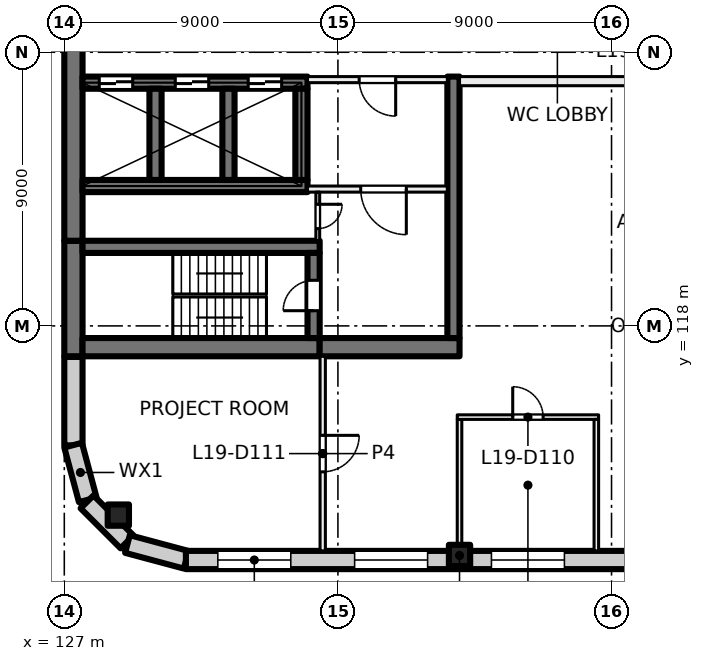
"""IFC4 building model, lengths in metres.
Left out: names, types, materials, properties, quantities, classifications, styles, units other than length and angle.
Written with IfcOpenShell. Run it as: python <this file> out.ifc"""

import sys

from ifc_helpers import new_model, si_unit, direction, frame, frame_2d, origin, origin_2d, place, context, subcontext, project, spatial, rectangle, extrude, element, fill, save


model = new_model("IFC4")
c1 = context("Model", 3, precision=1e-05, world=origin(), true_north=direction((0.0, 1.0)))
c2 = subcontext(c1, "Body", "Model", "MODEL_VIEW")
j1 = project(units=[si_unit("LENGTHUNIT", "METRE"), si_unit("PLANEANGLEUNIT", "RADIAN")], contexts=[c1])
p1 = place(None, origin())
s1 = spatial("IfcSite", under=j1, at=p1, CompositionType="ELEMENT")
p2 = place(p1, origin())
s2 = spatial("IfcBuilding", under=s1, at=p2, CompositionType="ELEMENT")
p3 = place(p2, frame((0.0, 0.0, 85.0)))
s3 = spatial("IfcBuildingStorey", under=s2, at=p3, CompositionType="ELEMENT", Elevation=85.0)
for number, where, z_axis, x_axis in (
    (1, (128.777, 111.777, 0.0), (0.0, 0.0, 1.0), (1.0, 0.0, 0.0)),
    (2, (140.0, 110.45, 0.0), (0.0, 0.0, 1.0), (1.0, 0.0, 0.0)),
):
    element("IfcColumn", number, at=place(p3, frame(where, z_axis=z_axis, x_axis=x_axis)), inside=s3, PredefinedType="COLUMN", context=c2, shape_type="SweptSolid", body=[
        extrude(rectangle(XDim=0.7, YDim=0.7, at=origin_2d()), origin(), (0.0, 0.0, 1.0), 4.0),
    ])
p4 = place(p3, frame((127.3, 117.0, 0.0), z_axis=(0.0, 0.0, 1.0), x_axis=(0.0, 1.0, 0.0)))
e3 = element("IfcWall", 3, at=p4, inside=s3, PredefinedType="SHEAR", context=c2, shape_type="SweptSolid", body=[
    extrude(rectangle(XDim=3.8, YDim=0.6, at=frame_2d((1.9, 0.0))), origin(), (0.0, 0.0, 1.0), 4.0),
])
p5 = place(p3, frame((127.3, 120.8, 0.0), z_axis=(0.0, 0.0, 1.0), x_axis=(0.0, 1.0, 0.0)))
e4 = element("IfcWall", 4, at=p5, inside=s3, PredefinedType="SHEAR", context=c2, shape_type="SweptSolid", body=[
    extrude(rectangle(XDim=14.4, YDim=0.6, at=frame_2d((7.2, 0.0))), origin(), (0.0, 0.0, 1.0), 4.0),
])
p6 = place(p3, frame((127.6, 117.3, 0.0), z_axis=(0.0, 0.0, 1.0), x_axis=(1.0, 0.0, 0.0)))
e5 = element("IfcWall", 5, at=p6, inside=s3, PredefinedType="SHEAR", context=c2, shape_type="SweptSolid", body=[
    extrude(rectangle(XDim=7.8, YDim=0.6, at=frame_2d((3.9, 0.0))), origin(), (0.0, 0.0, 1.0), 4.0),
])
p7 = place(p3, frame((135.4, 117.3, 0.0), z_axis=(0.0, 0.0, 1.0), x_axis=(1.0, 0.0, 0.0)))
e6 = element("IfcWall", 6, at=p7, inside=s3, PredefinedType="SHEAR", context=c2, shape_type="SweptSolid", body=[
    extrude(rectangle(XDim=4.6, YDim=0.6, at=frame_2d((2.3, 0.0))), origin(), (0.0, 0.0, 1.0), 4.0),
])
p8 = place(p3, frame((127.6, 120.6, 0.0), z_axis=(0.0, 0.0, 1.0), x_axis=(1.0, 0.0, 0.0)))
e7 = element("IfcWall", 7, at=p8, inside=s3, PredefinedType="SHEAR", context=c2, shape_type="SweptSolid", body=[
    extrude(rectangle(XDim=7.8, YDim=0.4, at=frame_2d((3.9, 0.0))), origin(), (0.0, 0.0, 1.0), 4.0),
])
p9 = place(p3, frame((135.2, 117.6, 0.0), z_axis=(0.0, 0.0, 1.0), x_axis=(0.0, 1.0, 0.0)))
e8 = element("IfcWall", 8, at=p9, inside=s3, PredefinedType="SHEAR", context=c2, shape_type="SweptSolid", body=[
    extrude(rectangle(XDim=2.8, YDim=0.4, at=frame_2d((1.4, 0.0))), origin(), (0.0, 0.0, 1.0), 4.0),
])
p10 = place(p9, frame((0.9, 0.0, 0.0)))
e9 = element("IfcOpeningElement", 9, at=p10, cuts=e8, PredefinedType="OPENING", context=c2, shape_type="SweptSolid", body=[
    extrude(rectangle(XDim=1.0, YDim=2.1, at=frame_2d((0.5, 1.05))), frame((0.0, 0.21, 0.0), z_axis=(0.0, -1.0, 0.0), x_axis=(1.0, 0.0, 0.0)), (0.0, 0.0, 1.0), 0.42),
])
p11 = place(p3, frame((127.6, 126.0, 0.0), z_axis=(0.0, 0.0, 1.0), x_axis=(1.0, 0.0, 0.0)))
e10 = element("IfcWall", 10, at=p11, inside=s3, PredefinedType="SHEAR", context=c2, shape_type="SweptSolid", body=[
    extrude(rectangle(XDim=7.4, YDim=0.4, at=frame_2d((3.7, 0.0))), origin(), (0.0, 0.0, 1.0), 4.0),
])
p12 = place(p11, frame((0.55, 0.0, 0.0)))
e11 = element("IfcOpeningElement", 11, at=p12, cuts=e10, PredefinedType="OPENING", context=c2, shape_type="SweptSolid", body=[
    extrude(rectangle(XDim=1.1, YDim=2.1, at=frame_2d((0.55, 1.05))), frame((0.0, 0.21, 0.0), z_axis=(0.0, -1.0, 0.0), x_axis=(1.0, 0.0, 0.0)), (0.0, 0.0, 1.0), 0.42),
])
p13 = place(p11, frame((3.05, 0.0, 0.0)))
e12 = element("IfcOpeningElement", 12, at=p13, cuts=e10, PredefinedType="OPENING", context=c2, shape_type="SweptSolid", body=[
    extrude(rectangle(XDim=1.1, YDim=2.1, at=frame_2d((0.55, 1.05))), frame((0.0, 0.21, 0.0), z_axis=(0.0, -1.0, 0.0), x_axis=(1.0, 0.0, 0.0)), (0.0, 0.0, 1.0), 0.42),
])
p14 = place(p11, frame((5.45, 0.0, 0.0)))
e13 = element("IfcOpeningElement", 13, at=p14, cuts=e10, PredefinedType="OPENING", context=c2, shape_type="SweptSolid", body=[
    extrude(rectangle(XDim=1.1, YDim=2.1, at=frame_2d((0.55, 1.05))), frame((0.0, 0.21, 0.0), z_axis=(0.0, -1.0, 0.0), x_axis=(1.0, 0.0, 0.0)), (0.0, 0.0, 1.0), 0.42),
])
p15 = place(p3, frame((127.6, 122.6, 0.0), z_axis=(0.0, 0.0, 1.0), x_axis=(1.0, 0.0, 0.0)))
e14 = element("IfcWall", 14, at=p15, inside=s3, PredefinedType="SHEAR", context=c2, shape_type="SweptSolid", body=[
    extrude(rectangle(XDim=7.4, YDim=0.4, at=frame_2d((3.7, 0.0))), origin(), (0.0, 0.0, 1.0), 4.0),
])
for number, where, z_axis, x_axis in (
    (15, (130.0, 122.8, 0.0), (0.0, 0.0, 1.0), (0.0, 1.0, 0.0)),
    (16, (132.4, 122.8, 0.0), (0.0, 0.0, 1.0), (0.0, 1.0, 0.0)),
    (17, (134.8, 122.8, 0.0), (0.0, 0.0, 1.0), (0.0, 1.0, 0.0)),
):
    element("IfcWall", number, at=place(p3, frame(where, z_axis=z_axis, x_axis=x_axis)), inside=s3, PredefinedType="SHEAR", context=c2, shape_type="SweptSolid", body=[
        extrude(rectangle(XDim=3.0, YDim=0.4, at=frame_2d((1.5, 0.0))), origin(), (0.0, 0.0, 1.0), 4.0),
    ])
p16 = place(p3, frame((139.8, 117.6, 0.0), z_axis=(0.0, 0.0, 1.0), x_axis=(0.0, 1.0, 0.0)))
e18 = element("IfcWall", 18, at=p16, inside=s3, PredefinedType="SHEAR", context=c2, shape_type="SweptSolid", body=[
    extrude(rectangle(XDim=8.6, YDim=0.4, at=frame_2d((4.3, 0.0))), origin(), (0.0, 0.0, 1.0), 4.0),
])
p17 = place(p3, frame((127.3, 114.07, 0.0), z_axis=(0.0, 0.0, 1.0), x_axis=(0.0, 1.0, 0.0)))
e19 = element("IfcWall", 19, at=p17, inside=s3, PredefinedType="SOLIDWALL", context=c2, shape_type="SweptSolid", body=[
    extrude(rectangle(XDim=2.91, YDim=0.6, at=frame_2d((1.455, 0.0))), origin(), (0.0, 0.0, 1.0), 3.625),
])
for number, where, z_axis, x_axis in (
    (20, (127.771, 112.281, 0.0), (0.0, 0.0, 1.0), (-0.259, 0.966, 0.0)),
    (21, (129.064, 110.896, 0.0), (0.0, 0.0, 1.0), (-0.707, 0.707, 0.0)),
):
    element("IfcWall", number, at=place(p3, frame(where, z_axis=z_axis, x_axis=x_axis)), inside=s3, PredefinedType="SOLIDWALL", context=c2, shape_type="SweptSolid", body=[
        extrude(rectangle(XDim=1.861, YDim=0.6, at=frame_2d((0.93, 0.0))), origin(), (0.0, 0.0, 1.0), 3.625),
    ])
p18 = place(p3, frame((131.01, 110.308, 0.0), z_axis=(0.0, 0.0, 1.0), x_axis=(-0.965920269068, 0.258839784042, 0.0)))
e22 = element("IfcWall", 22, at=p18, inside=s3, PredefinedType="SOLIDWALL", context=c2, shape_type="SweptSolid", body=[
    extrude(rectangle(XDim=2.0, YDim=0.6, at=frame_2d((1.0, 0.0))), origin(), (0.0, 0.0, 1.0), 3.625),
])
p19 = place(p3, frame((162.93, 110.3, 0.0), z_axis=(0.0, 0.0, 1.0), x_axis=(-1.0, 0.0, 0.0)))
e23 = element("IfcWall", 23, at=p19, inside=s3, PredefinedType="SOLIDWALL", context=c2, shape_type="SweptSolid", body=[
    extrude(rectangle(XDim=31.93, YDim=0.6, at=frame_2d((15.965, 0.0))), origin(), (0.0, 0.0, 1.0), 3.625),
])
p20 = place(p19, frame((1.48, 0.0, 0.9)))
e24 = element("IfcOpeningElement", 24, at=p20, cuts=e23, PredefinedType="OPENING", context=c2, shape_type="SweptSolid", body=[
    extrude(rectangle(XDim=2.4, YDim=2.4, at=frame_2d((1.2, 1.2))), frame((0.0, 0.31, 0.0), z_axis=(0.0, -1.0, 0.0), x_axis=(1.0, 0.0, 0.0)), (0.0, 0.0, 1.0), 0.62),
])
p21 = place(p19, frame((5.98, 0.0, 0.9)))
e25 = element("IfcOpeningElement", 25, at=p21, cuts=e23, PredefinedType="OPENING", context=c2, shape_type="SweptSolid", body=[
    extrude(rectangle(XDim=2.4, YDim=2.4, at=frame_2d((1.2, 1.2))), frame((0.0, 0.31, 0.0), z_axis=(0.0, -1.0, 0.0), x_axis=(1.0, 0.0, 0.0)), (0.0, 0.0, 1.0), 0.62),
])
p22 = place(p19, frame((10.48, 0.0, 0.9)))
e26 = element("IfcOpeningElement", 26, at=p22, cuts=e23, PredefinedType="OPENING", context=c2, shape_type="SweptSolid", body=[
    extrude(rectangle(XDim=2.4, YDim=2.4, at=frame_2d((1.2, 1.2))), frame((0.0, 0.31, 0.0), z_axis=(0.0, -1.0, 0.0), x_axis=(1.0, 0.0, 0.0)), (0.0, 0.0, 1.0), 0.62),
])
p23 = place(p19, frame((14.98, 0.0, 0.9)))
e27 = element("IfcOpeningElement", 27, at=p23, cuts=e23, PredefinedType="OPENING", context=c2, shape_type="SweptSolid", body=[
    extrude(rectangle(XDim=2.4, YDim=2.4, at=frame_2d((1.2, 1.2))), frame((0.0, 0.31, 0.0), z_axis=(0.0, -1.0, 0.0), x_axis=(1.0, 0.0, 0.0)), (0.0, 0.0, 1.0), 0.62),
])
p24 = place(p19, frame((19.48, 0.0, 0.9)))
e28 = element("IfcOpeningElement", 28, at=p24, cuts=e23, PredefinedType="OPENING", context=c2, shape_type="SweptSolid", body=[
    extrude(rectangle(XDim=2.4, YDim=2.4, at=frame_2d((1.2, 1.2))), frame((0.0, 0.31, 0.0), z_axis=(0.0, -1.0, 0.0), x_axis=(1.0, 0.0, 0.0)), (0.0, 0.0, 1.0), 0.62),
])
p25 = place(p19, frame((23.98, 0.0, 0.9)))
e29 = element("IfcOpeningElement", 29, at=p25, cuts=e23, PredefinedType="OPENING", context=c2, shape_type="SweptSolid", body=[
    extrude(rectangle(XDim=2.4, YDim=2.4, at=frame_2d((1.2, 1.2))), frame((0.0, 0.31, 0.0), z_axis=(0.0, -1.0, 0.0), x_axis=(1.0, 0.0, 0.0)), (0.0, 0.0, 1.0), 0.62),
])
p26 = place(p19, frame((28.48, 0.0, 0.9)))
e30 = element("IfcOpeningElement", 30, at=p26, cuts=e23, PredefinedType="OPENING", context=c2, shape_type="SweptSolid", body=[
    extrude(rectangle(XDim=2.4, YDim=2.4, at=frame_2d((1.2, 1.2))), frame((0.0, 0.31, 0.0), z_axis=(0.0, -1.0, 0.0), x_axis=(1.0, 0.0, 0.0)), (0.0, 0.0, 1.0), 0.62),
])
p27 = place(p3, frame((139.6, 126.1, 0.0), z_axis=(0.0, 0.0, 1.0), x_axis=(-1.0, 0.0, 0.0)))
e31 = element("IfcWall", 31, at=p27, inside=s3, PredefinedType="PARTITIONING", context=c2, shape_type="SweptSolid", body=[
    extrude(rectangle(XDim=4.6, YDim=0.2, at=frame_2d((2.3, 0.0))), origin(), (0.0, 0.0, 1.0), 3.625),
])
p28 = place(p27, frame((1.7, 0.0, 0.0)))
e32 = element("IfcOpeningElement", 32, at=p28, cuts=e31, PredefinedType="OPENING", context=c2, shape_type="SweptSolid", body=[
    extrude(rectangle(XDim=1.2, YDim=2.1, at=frame_2d((0.6, 1.05))), frame((0.0, 0.11, 0.0), z_axis=(0.0, -1.0, 0.0), x_axis=(1.0, 0.0, 0.0)), (0.0, 0.0, 1.0), 0.22),
])
p29 = place(p3, frame((139.6, 122.5, 0.0), z_axis=(0.0, 0.0, 1.0), x_axis=(-1.0, 0.0, 0.0)))
e33 = element("IfcWall", 33, at=p29, inside=s3, PredefinedType="PARTITIONING", context=c2, shape_type="SweptSolid", body=[
    extrude(rectangle(XDim=4.6, YDim=0.2, at=frame_2d((2.3, 0.0))), origin(), (0.0, 0.0, 1.0), 3.625),
])
p30 = place(p29, frame((1.35, 0.0, 0.0)))
e34 = element("IfcOpeningElement", 34, at=p30, cuts=e33, PredefinedType="OPENING", context=c2, shape_type="SweptSolid", body=[
    extrude(rectangle(XDim=1.5, YDim=2.1, at=frame_2d((0.75, 1.05))), frame((0.0, 0.11, 0.0), z_axis=(0.0, -1.0, 0.0), x_axis=(1.0, 0.0, 0.0)), (0.0, 0.0, 1.0), 0.22),
])
p31 = place(p3, frame((135.337, 122.4, 0.0), z_axis=(0.0, 0.0, 1.0), x_axis=(0.0, -1.0, 0.0)))
e35 = element("IfcWall", 35, at=p31, inside=s3, PredefinedType="PARTITIONING", context=c2, shape_type="SweptSolid", body=[
    extrude(rectangle(XDim=1.6, YDim=0.125, at=frame_2d((0.8, 0.0))), origin(), (0.0, 0.0, 1.0), 3.625),
])
p32 = place(p31, frame((0.4, 0.0, 0.0)))
e36 = element("IfcOpeningElement", 36, at=p32, cuts=e35, PredefinedType="OPENING", context=c2, shape_type="SweptSolid", body=[
    extrude(rectangle(XDim=0.8, YDim=2.1, at=frame_2d((0.4, 1.05))), frame((0.0, 0.073, 0.0), z_axis=(0.0, -1.0, 0.0), x_axis=(1.0, 0.0, 0.0)), (0.0, 0.0, 1.0), 0.145),
])
p33 = place(p3, frame((135.5, 117.0, 0.0), z_axis=(0.0, 0.0, 1.0), x_axis=(0.0, -1.0, 0.0)))
e37 = element("IfcWall", 37, at=p33, inside=s3, PredefinedType="PARTITIONING", context=c2, shape_type="SweptSolid", body=[
    extrude(rectangle(XDim=6.4, YDim=0.175, at=frame_2d((3.2, 0.0))), origin(), (0.0, 0.0, 1.0), 3.625),
])
p34 = place(p33, frame((2.6, 0.0, 0.0)))
e38 = element("IfcOpeningElement", 38, at=p34, cuts=e37, PredefinedType="OPENING", context=c2, shape_type="SweptSolid", body=[
    extrude(rectangle(XDim=1.2, YDim=2.1, at=frame_2d((0.6, 1.05))), frame((0.0, 0.097, 0.0), z_axis=(0.0, -1.0, 0.0), x_axis=(1.0, 0.0, 0.0)), (0.0, 0.0, 1.0), 0.195),
])
p35 = place(p3, frame((140.0, 110.6, 0.0), z_axis=(0.0, 0.0, 1.0), x_axis=(0.0, 1.0, 0.0)))
e39 = element("IfcWall", 39, at=p35, inside=s3, PredefinedType="PARTITIONING", context=c2, shape_type="SweptSolid", body=[
    extrude(rectangle(XDim=4.325, YDim=0.15, at=frame_2d((2.163, 0.0))), origin(), (0.0, 0.0, 1.0), 3.625),
])
p36 = place(p3, frame((139.925, 115.0, 0.0), z_axis=(0.0, 0.0, 1.0), x_axis=(1.0, 0.0, 0.0)))
e40 = element("IfcWall", 40, at=p36, inside=s3, PredefinedType="PARTITIONING", context=c2, shape_type="SweptSolid", body=[
    extrude(rectangle(XDim=4.65, YDim=0.15, at=frame_2d((2.325, 0.0))), origin(), (0.0, 0.0, 1.0), 3.625),
])
p37 = place(p36, frame((1.825, 0.0, 0.0)))
e41 = element("IfcOpeningElement", 41, at=p37, cuts=e40, PredefinedType="OPENING", context=c2, shape_type="SweptSolid", body=[
    extrude(rectangle(XDim=1.0, YDim=2.1, at=frame_2d((0.5, 1.05))), frame((0.0, 0.085, 0.0), z_axis=(0.0, -1.0, 0.0), x_axis=(1.0, 0.0, 0.0)), (0.0, 0.0, 1.0), 0.17),
])
p38 = place(p3, frame((144.5, 114.925, 0.0), z_axis=(0.0, 0.0, 1.0), x_axis=(0.0, -1.0, 0.0)))
e42 = element("IfcWall", 42, at=p38, inside=s3, PredefinedType="PARTITIONING", context=c2, shape_type="SweptSolid", body=[
    extrude(rectangle(XDim=4.325, YDim=0.15, at=frame_2d((2.163, 0.0))), origin(), (0.0, 0.0, 1.0), 3.625),
])
p39 = place(p3, frame((154.0, 126.05, 0.0), z_axis=(0.0, 0.0, 1.0), x_axis=(-1.0, 0.0, 0.0)))
e43 = element("IfcWall", 43, at=p39, inside=s3, PredefinedType="PARTITIONING", context=c2, shape_type="SweptSolid", body=[
    extrude(rectangle(XDim=14.0, YDim=0.3, at=frame_2d((7.0, 0.0))), origin(), (0.0, 0.0, 1.0), 3.625),
])
p40 = place(p39, frame((6.1, 0.0, 0.0)))
e44 = element("IfcOpeningElement", 44, at=p40, cuts=e43, PredefinedType="OPENING", context=c2, shape_type="SweptSolid", body=[
    extrude(rectangle(XDim=1.8, YDim=2.1, at=frame_2d((0.9, 1.05))), frame((0.0, 0.16, 0.0), z_axis=(0.0, -1.0, 0.0), x_axis=(1.0, 0.0, 0.0)), (0.0, 0.0, 1.0), 0.32),
])
p41 = place(p24, origin())
e45 = element("IfcWindow", 45, at=p41, inside=s3, PartitioningType="SINGLE_PANEL", PredefinedType="WINDOW", context=c2, shape_type="SweptSolid", body=[
    extrude(rectangle(XDim=2.4, YDim=2.4, at=frame_2d((1.2, 1.2))), frame((0.0, 0.03, 0.0), z_axis=(0.0, -1.0, 0.0), x_axis=(1.0, 0.0, 0.0)), (0.0, 0.0, 1.0), 0.06),
])
fill(e28, e45)
p42 = place(p25, origin())
e46 = element("IfcWindow", 46, at=p42, inside=s3, PartitioningType="SINGLE_PANEL", PredefinedType="WINDOW", context=c2, shape_type="SweptSolid", body=[
    extrude(rectangle(XDim=2.4, YDim=2.4, at=frame_2d((1.2, 1.2))), frame((0.0, 0.03, 0.0), z_axis=(0.0, -1.0, 0.0), x_axis=(1.0, 0.0, 0.0)), (0.0, 0.0, 1.0), 0.06),
])
fill(e29, e46)
p43 = place(p26, origin())
e47 = element("IfcWindow", 47, at=p43, inside=s3, PartitioningType="SINGLE_PANEL", PredefinedType="WINDOW", context=c2, shape_type="SweptSolid", body=[
    extrude(rectangle(XDim=2.4, YDim=2.4, at=frame_2d((1.2, 1.2))), frame((0.0, 0.03, 0.0), z_axis=(0.0, -1.0, 0.0), x_axis=(1.0, 0.0, 0.0)), (0.0, 0.0, 1.0), 0.06),
])
fill(e30, e47)
p44 = place(p12, origin())
e48 = element("IfcDoor", 48, at=p44, inside=s3, OperationType="DOUBLE_DOOR_SLIDING", PredefinedType="DOOR", context=c2, shape_type="SweptSolid", body=[
    extrude(rectangle(XDim=1.1, YDim=2.1, at=frame_2d((0.55, 1.05))), frame((0.0, 0.025, 0.0), z_axis=(0.0, -1.0, 0.0), x_axis=(1.0, 0.0, 0.0)), (0.0, 0.0, 1.0), 0.05),
])
fill(e11, e48)
p45 = place(p13, origin())
e49 = element("IfcDoor", 49, at=p45, inside=s3, OperationType="DOUBLE_DOOR_SLIDING", PredefinedType="DOOR", context=c2, shape_type="SweptSolid", body=[
    extrude(rectangle(XDim=1.1, YDim=2.1, at=frame_2d((0.55, 1.05))), frame((0.0, 0.025, 0.0), z_axis=(0.0, -1.0, 0.0), x_axis=(1.0, 0.0, 0.0)), (0.0, 0.0, 1.0), 0.05),
])
fill(e12, e49)
p46 = place(p14, origin())
e50 = element("IfcDoor", 50, at=p46, inside=s3, OperationType="DOUBLE_DOOR_SLIDING", PredefinedType="DOOR", context=c2, shape_type="SweptSolid", body=[
    extrude(rectangle(XDim=1.1, YDim=2.1, at=frame_2d((0.55, 1.05))), frame((0.0, 0.025, 0.0), z_axis=(0.0, -1.0, 0.0), x_axis=(1.0, 0.0, 0.0)), (0.0, 0.0, 1.0), 0.05),
])
fill(e13, e50)
p47 = place(p28, origin())
e51 = element("IfcDoor", 51, at=p47, inside=s3, OperationType="DOUBLE_DOOR_SINGLE_SWING", PredefinedType="DOOR", context=c2, shape_type="SweptSolid", body=[
    extrude(rectangle(XDim=1.2, YDim=2.1, at=frame_2d((0.6, 1.05))), frame((0.0, 0.025, 0.0), z_axis=(0.0, -1.0, 0.0), x_axis=(1.0, 0.0, 0.0)), (0.0, 0.0, 1.0), 0.05),
])
fill(e32, e51)
p48 = place(p30, origin())
e52 = element("IfcDoor", 52, at=p48, inside=s3, OperationType="DOUBLE_DOOR_SINGLE_SWING", PredefinedType="DOOR", context=c2, shape_type="SweptSolid", body=[
    extrude(rectangle(XDim=1.5, YDim=2.1, at=frame_2d((0.75, 1.05))), frame((0.0, 0.025, 0.0), z_axis=(0.0, -1.0, 0.0), x_axis=(1.0, 0.0, 0.0)), (0.0, 0.0, 1.0), 0.05),
])
fill(e34, e52)
p49 = place(p10, origin())
e53 = element("IfcDoor", 53, at=p49, inside=s3, OperationType="SINGLE_SWING_RIGHT", PredefinedType="DOOR", context=c2, shape_type="SweptSolid", body=[
    extrude(rectangle(XDim=1.0, YDim=2.1, at=frame_2d((0.5, 1.05))), frame((0.0, 0.025, 0.0), z_axis=(0.0, -1.0, 0.0), x_axis=(1.0, 0.0, 0.0)), (0.0, 0.0, 1.0), 0.05),
])
fill(e9, e53)
p50 = place(p32, origin())
e54 = element("IfcDoor", 54, at=p50, inside=s3, OperationType="SINGLE_SWING_LEFT", PredefinedType="DOOR", context=c2, shape_type="SweptSolid", body=[
    extrude(rectangle(XDim=0.8, YDim=2.1, at=frame_2d((0.4, 1.05))), frame((0.0, 0.025, 0.0), z_axis=(0.0, -1.0, 0.0), x_axis=(1.0, 0.0, 0.0)), (0.0, 0.0, 1.0), 0.05),
])
fill(e36, e54)
p51 = place(p37, origin())
e55 = element("IfcDoor", 55, at=p51, inside=s3, OperationType="SINGLE_SWING_LEFT", PredefinedType="DOOR", context=c2, shape_type="SweptSolid", body=[
    extrude(rectangle(XDim=1.0, YDim=2.1, at=frame_2d((0.5, 1.05))), frame((0.0, 0.025, 0.0), z_axis=(0.0, -1.0, 0.0), x_axis=(1.0, 0.0, 0.0)), (0.0, 0.0, 1.0), 0.05),
])
fill(e41, e55)
p52 = place(p34, origin())
e56 = element("IfcDoor", 56, at=p52, inside=s3, OperationType="DOUBLE_DOOR_SINGLE_SWING", PredefinedType="DOOR", context=c2, shape_type="SweptSolid", body=[
    extrude(rectangle(XDim=1.2, YDim=2.1, at=frame_2d((0.6, 1.05))), frame((0.0, 0.025, 0.0), z_axis=(0.0, -1.0, 0.0), x_axis=(1.0, 0.0, 0.0)), (0.0, 0.0, 1.0), 0.05),
])
fill(e38, e56)
save(model, sys.argv[1])
